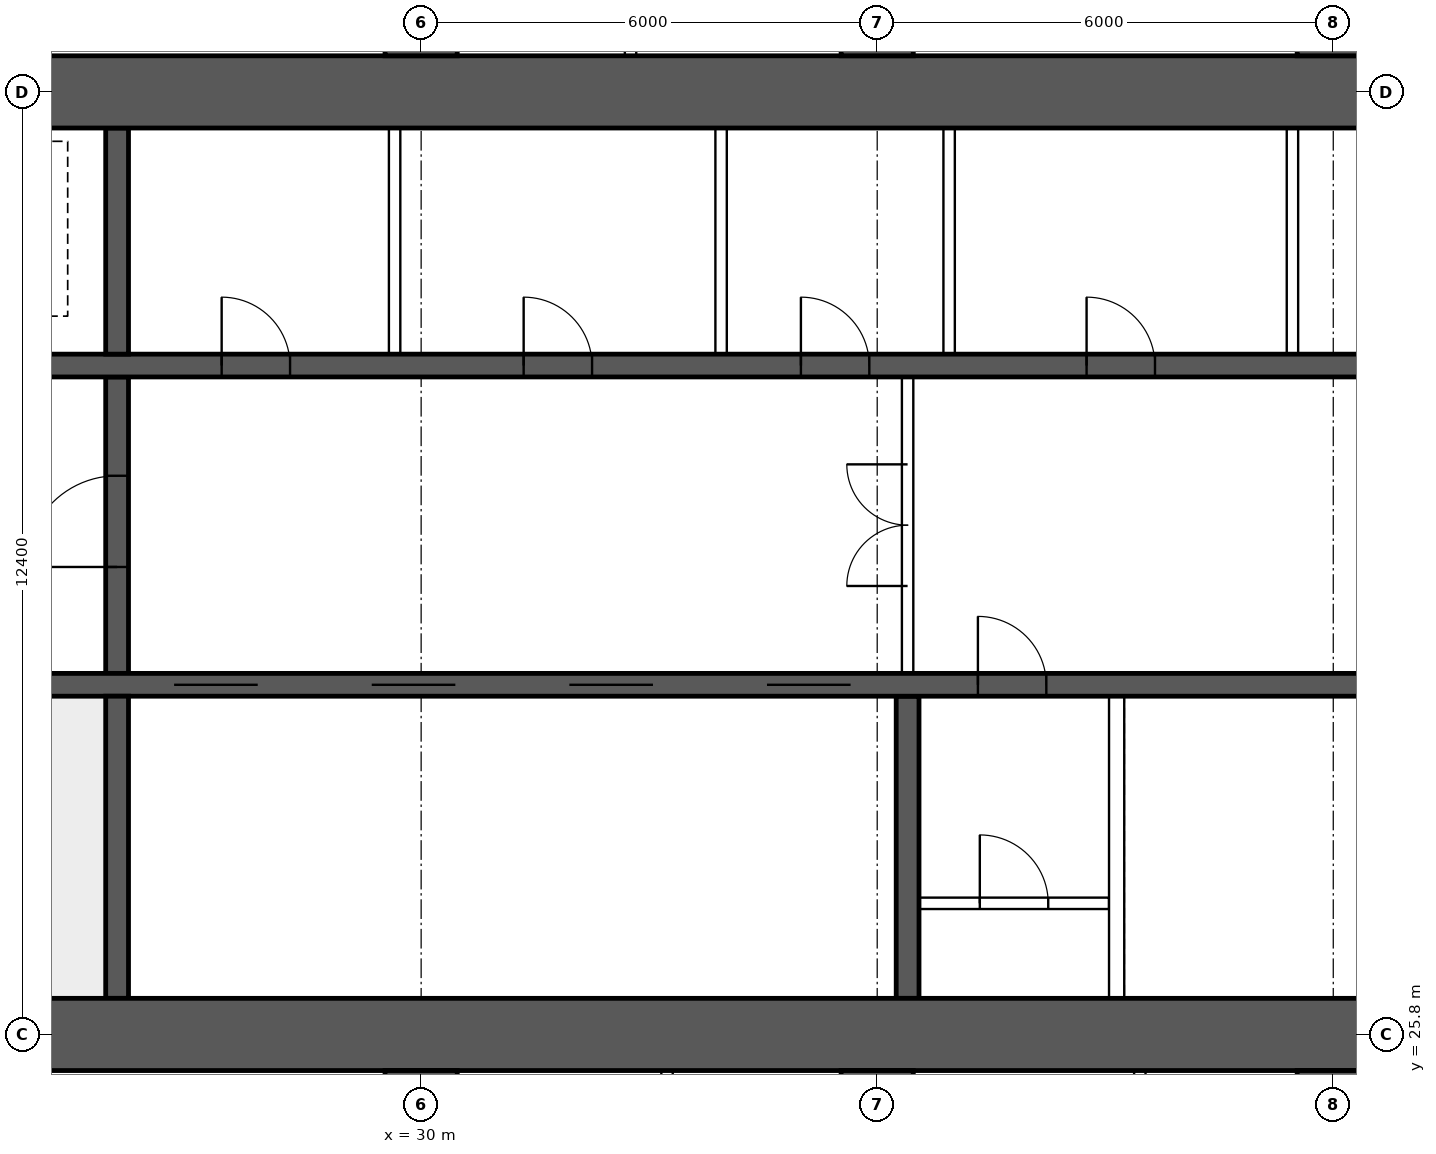
"""IFC4 building model, lengths in metres.
Left out: names, types, materials, properties, quantities, classifications, styles, units other than length and angle.
Written with IfcOpenShell. Run it as: python <this file> out.ifc"""

import sys

from ifc_helpers import new_model, si_unit, direction, frame, frame_2d, origin, place, context, subcontext, project, spatial, rectangle, extrude, element, fill, save


model = new_model("IFC4")
c1 = context("Model", 3, precision=1e-05, world=origin(), true_north=direction((0.0, 1.0)))
c2 = subcontext(c1, "Body", "Model", "MODEL_VIEW")
j1 = project(units=[si_unit("LENGTHUNIT", "METRE"), si_unit("PLANEANGLEUNIT", "RADIAN")], contexts=[c1])
p1 = place(None, origin())
s1 = spatial("IfcSite", under=j1, at=p1, CompositionType="ELEMENT")
p2 = place(p1, origin())
s2 = spatial("IfcBuilding", under=s1, at=p2, CompositionType="ELEMENT")
p3 = place(p2, frame((0.0, 0.0, 91.9)))
s3 = spatial("IfcBuildingStorey", under=s2, at=p3, CompositionType="ELEMENT", Elevation=91.9)
for number, where, z_axis, x_axis in (
    (1, (18.0, 25.8, 0.0), (0.0, 0.0, 1.0), (1.0, 0.0, 0.0)),
    (2, (18.0, 38.2, 0.0), (0.0, 0.0, 1.0), (1.0, 0.0, 0.0)),
):
    element("IfcWall", number, at=place(p3, frame(where, z_axis=z_axis, x_axis=x_axis)), inside=s3, PredefinedType="SHEAR", context=c2, shape_type="SweptSolid", body=[
        extrude(rectangle(XDim=48.0, YDim=0.95, at=frame_2d((24.0, 0.0))), origin(), (0.0, 0.0, 1.0), 3.75),
    ])
p4 = place(p3, frame((18.475, 30.4, 0.0), z_axis=(0.0, 0.0, 1.0), x_axis=(1.0, 0.0, 0.0)))
e3 = element("IfcWall", 3, at=p4, inside=s3, PredefinedType="SHEAR", context=c2, shape_type="SweptSolid", body=[
    extrude(rectangle(XDim=47.05, YDim=0.3, at=frame_2d((23.525, 0.0))), origin(), (0.0, 0.0, 1.0), 3.75),
])
p5 = place(p4, frame((0.4, 0.0, 0.0)))
e4 = element("IfcOpeningElement", 4, at=p5, cuts=e3, PredefinedType="OPENING", context=c2, shape_type="SweptSolid", body=[
    extrude(rectangle(XDim=1.0, YDim=2.1, at=frame_2d((0.5, 1.05))), frame((0.0, 0.16, 0.0), z_axis=(0.0, -1.0, 0.0), x_axis=(1.0, 0.0, 0.0)), (0.0, 0.0, 1.0), 0.32),
])
p6 = place(p4, frame((45.65, 0.0, 0.0)))
e5 = element("IfcOpeningElement", 5, at=p6, cuts=e3, PredefinedType="OPENING", context=c2, shape_type="SweptSolid", body=[
    extrude(rectangle(XDim=1.0, YDim=2.1, at=frame_2d((0.5, 1.05))), frame((0.0, 0.16, 0.0), z_axis=(0.0, -1.0, 0.0), x_axis=(1.0, 0.0, 0.0)), (0.0, 0.0, 1.0), 0.32),
])
p7 = place(p4, frame((8.275, 0.0, 0.0)))
e6 = element("IfcOpeningElement", 6, at=p7, cuts=e3, PredefinedType="OPENING", context=c2, shape_type="SweptSolid", body=[
    extrude(rectangle(XDim=1.1, YDim=2.1, at=frame_2d((0.55, 1.05))), frame((0.0, 0.16, 0.0), z_axis=(0.0, -1.0, 0.0), x_axis=(1.0, 0.0, 0.0)), (0.0, 0.0, 1.0), 0.32),
])
p8 = place(p4, frame((10.875, 0.0, 0.0)))
e7 = element("IfcOpeningElement", 7, at=p8, cuts=e3, PredefinedType="OPENING", context=c2, shape_type="SweptSolid", body=[
    extrude(rectangle(XDim=1.1, YDim=2.1, at=frame_2d((0.55, 1.05))), frame((0.0, 0.16, 0.0), z_axis=(0.0, -1.0, 0.0), x_axis=(1.0, 0.0, 0.0)), (0.0, 0.0, 1.0), 0.32),
])
p9 = place(p4, frame((13.475, 0.0, 0.0)))
e8 = element("IfcOpeningElement", 8, at=p9, cuts=e3, PredefinedType="OPENING", context=c2, shape_type="SweptSolid", body=[
    extrude(rectangle(XDim=1.1, YDim=2.1, at=frame_2d((0.55, 1.05))), frame((0.0, 0.16, 0.0), z_axis=(0.0, -1.0, 0.0), x_axis=(1.0, 0.0, 0.0)), (0.0, 0.0, 1.0), 0.32),
])
p10 = place(p4, frame((16.075, 0.0, 0.0)))
e9 = element("IfcOpeningElement", 9, at=p10, cuts=e3, PredefinedType="OPENING", context=c2, shape_type="SweptSolid", body=[
    extrude(rectangle(XDim=1.1, YDim=2.1, at=frame_2d((0.55, 1.05))), frame((0.0, 0.16, 0.0), z_axis=(0.0, -1.0, 0.0), x_axis=(1.0, 0.0, 0.0)), (0.0, 0.0, 1.0), 0.32),
])
p11 = place(p4, frame((18.85, 0.0, 0.0)))
e10 = element("IfcOpeningElement", 10, at=p11, cuts=e3, PredefinedType="OPENING", context=c2, shape_type="SweptSolid", body=[
    extrude(rectangle(XDim=0.9, YDim=2.1, at=frame_2d((0.45, 1.05))), frame((0.0, 0.16, 0.0), z_axis=(0.0, -1.0, 0.0), x_axis=(1.0, 0.0, 0.0)), (0.0, 0.0, 1.0), 0.32),
])
p12 = place(p4, frame((30.142, 0.0, 0.0)))
e11 = element("IfcOpeningElement", 11, at=p12, cuts=e3, PredefinedType="OPENING", context=c2, shape_type="SweptSolid", body=[
    extrude(rectangle(XDim=1.1, YDim=2.1, at=frame_2d((0.55, 1.05))), frame((0.0, 0.16, 0.0), z_axis=(0.0, -1.0, 0.0), x_axis=(1.0, 0.0, 0.0)), (0.0, 0.0, 1.0), 0.32),
])
p13 = place(p4, frame((33.675, 0.0, 0.0)))
e12 = element("IfcOpeningElement", 12, at=p13, cuts=e3, PredefinedType="OPENING", context=c2, shape_type="SweptSolid", body=[
    extrude(rectangle(XDim=1.1, YDim=2.1, at=frame_2d((0.55, 1.05))), frame((0.0, 0.16, 0.0), z_axis=(0.0, -1.0, 0.0), x_axis=(1.0, 0.0, 0.0)), (0.0, 0.0, 1.0), 0.32),
])
p14 = place(p4, frame((37.208, 0.0, 0.0)))
e13 = element("IfcOpeningElement", 13, at=p14, cuts=e3, PredefinedType="OPENING", context=c2, shape_type="SweptSolid", body=[
    extrude(rectangle(XDim=1.1, YDim=2.1, at=frame_2d((0.55, 1.05))), frame((0.0, 0.16, 0.0), z_axis=(0.0, -1.0, 0.0), x_axis=(1.0, 0.0, 0.0)), (0.0, 0.0, 1.0), 0.32),
])
p15 = place(p3, frame((18.475, 34.6, 0.0), z_axis=(0.0, 0.0, 1.0), x_axis=(1.0, 0.0, 0.0)))
e14 = element("IfcWall", 14, at=p15, inside=s3, PredefinedType="SHEAR", context=c2, shape_type="SweptSolid", body=[
    extrude(rectangle(XDim=47.05, YDim=0.3, at=frame_2d((23.525, 0.0))), origin(), (0.0, 0.0, 1.0), 3.75),
])
p16 = place(p15, frame((0.9, 0.0, 0.0)))
e15 = element("IfcOpeningElement", 15, at=p16, cuts=e14, PredefinedType="OPENING", context=c2, shape_type="SweptSolid", body=[
    extrude(rectangle(XDim=1.1, YDim=2.1, at=frame_2d((0.55, 1.05))), frame((0.0, 0.16, 0.0), z_axis=(0.0, -1.0, 0.0), x_axis=(1.0, 0.0, 0.0)), (0.0, 0.0, 1.0), 0.32),
])
p17 = place(p15, frame((45.05, 0.0, 0.0)))
e16 = element("IfcOpeningElement", 16, at=p17, cuts=e14, PredefinedType="OPENING", context=c2, shape_type="SweptSolid", body=[
    extrude(rectangle(XDim=1.1, YDim=2.1, at=frame_2d((0.55, 1.05))), frame((0.0, 0.16, 0.0), z_axis=(0.0, -1.0, 0.0), x_axis=(1.0, 0.0, 0.0)), (0.0, 0.0, 1.0), 0.32),
])
p18 = place(p15, frame((4.125, 0.0, 0.0)))
e17 = element("IfcOpeningElement", 17, at=p18, cuts=e14, PredefinedType="OPENING", context=c2, shape_type="SweptSolid", body=[
    extrude(rectangle(XDim=0.9, YDim=2.1, at=frame_2d((0.45, 1.05))), frame((0.0, 0.16, 0.0), z_axis=(0.0, -1.0, 0.0), x_axis=(1.0, 0.0, 0.0)), (0.0, 0.0, 1.0), 0.32),
])
p19 = place(p15, frame((42.025, 0.0, 0.0)))
e18 = element("IfcOpeningElement", 18, at=p19, cuts=e14, PredefinedType="OPENING", context=c2, shape_type="SweptSolid", body=[
    extrude(rectangle(XDim=0.9, YDim=2.1, at=frame_2d((0.45, 1.05))), frame((0.0, 0.16, 0.0), z_axis=(0.0, -1.0, 0.0), x_axis=(1.0, 0.0, 0.0)), (0.0, 0.0, 1.0), 0.32),
])
p20 = place(p15, frame((8.9, 0.0, 0.0)))
e19 = element("IfcOpeningElement", 19, at=p20, cuts=e14, PredefinedType="OPENING", context=c2, shape_type="SweptSolid", body=[
    extrude(rectangle(XDim=0.9, YDim=2.1, at=frame_2d((0.45, 1.05))), frame((0.0, 0.16, 0.0), z_axis=(0.0, -1.0, 0.0), x_axis=(1.0, 0.0, 0.0)), (0.0, 0.0, 1.0), 0.32),
])
p21 = place(p15, frame((12.874, 0.0, 0.0)))
e20 = element("IfcOpeningElement", 20, at=p21, cuts=e14, PredefinedType="OPENING", context=c2, shape_type="SweptSolid", body=[
    extrude(rectangle(XDim=0.9, YDim=2.1, at=frame_2d((0.45, 1.05))), frame((0.0, 0.16, 0.0), z_axis=(0.0, -1.0, 0.0), x_axis=(1.0, 0.0, 0.0)), (0.0, 0.0, 1.0), 0.32),
])
p22 = place(p15, frame((16.521, 0.0, 0.0)))
e21 = element("IfcOpeningElement", 21, at=p22, cuts=e14, PredefinedType="OPENING", context=c2, shape_type="SweptSolid", body=[
    extrude(rectangle(XDim=0.9, YDim=2.1, at=frame_2d((0.45, 1.05))), frame((0.0, 0.16, 0.0), z_axis=(0.0, -1.0, 0.0), x_axis=(1.0, 0.0, 0.0)), (0.0, 0.0, 1.0), 0.32),
])
p23 = place(p15, frame((20.28, 0.0, 0.0)))
e22 = element("IfcOpeningElement", 22, at=p23, cuts=e14, PredefinedType="OPENING", context=c2, shape_type="SweptSolid", body=[
    extrude(rectangle(XDim=0.9, YDim=2.1, at=frame_2d((0.45, 1.05))), frame((0.0, 0.16, 0.0), z_axis=(0.0, -1.0, 0.0), x_axis=(1.0, 0.0, 0.0)), (0.0, 0.0, 1.0), 0.32),
])
p24 = place(p15, frame((24.686, 0.0, 0.0)))
e23 = element("IfcOpeningElement", 23, at=p24, cuts=e14, PredefinedType="OPENING", context=c2, shape_type="SweptSolid", body=[
    extrude(rectangle(XDim=0.9, YDim=2.1, at=frame_2d((0.45, 1.05))), frame((0.0, 0.16, 0.0), z_axis=(0.0, -1.0, 0.0), x_axis=(1.0, 0.0, 0.0)), (0.0, 0.0, 1.0), 0.32),
])
p25 = place(p15, frame((27.483, 0.0, 0.0)))
e24 = element("IfcOpeningElement", 24, at=p25, cuts=e14, PredefinedType="OPENING", context=c2, shape_type="SweptSolid", body=[
    extrude(rectangle(XDim=0.9, YDim=2.1, at=frame_2d((0.45, 1.05))), frame((0.0, 0.16, 0.0), z_axis=(0.0, -1.0, 0.0), x_axis=(1.0, 0.0, 0.0)), (0.0, 0.0, 1.0), 0.32),
])
p26 = place(p15, frame((30.666, 0.0, 0.0)))
e25 = element("IfcOpeningElement", 25, at=p26, cuts=e14, PredefinedType="OPENING", context=c2, shape_type="SweptSolid", body=[
    extrude(rectangle(XDim=0.9, YDim=2.1, at=frame_2d((0.45, 1.05))), frame((0.0, 0.16, 0.0), z_axis=(0.0, -1.0, 0.0), x_axis=(1.0, 0.0, 0.0)), (0.0, 0.0, 1.0), 0.32),
])
p27 = place(p15, frame((34.617, 0.0, 0.0)))
e26 = element("IfcOpeningElement", 26, at=p27, cuts=e14, PredefinedType="OPENING", context=c2, shape_type="SweptSolid", body=[
    extrude(rectangle(XDim=0.9, YDim=2.1, at=frame_2d((0.45, 1.05))), frame((0.0, 0.16, 0.0), z_axis=(0.0, -1.0, 0.0), x_axis=(1.0, 0.0, 0.0)), (0.0, 0.0, 1.0), 0.32),
])
p28 = place(p15, frame((37.555, 0.0, 0.0)))
e27 = element("IfcOpeningElement", 27, at=p28, cuts=e14, PredefinedType="OPENING", context=c2, shape_type="SweptSolid", body=[
    extrude(rectangle(XDim=0.9, YDim=2.1, at=frame_2d((0.45, 1.05))), frame((0.0, 0.16, 0.0), z_axis=(0.0, -1.0, 0.0), x_axis=(1.0, 0.0, 0.0)), (0.0, 0.0, 1.0), 0.32),
])
p29 = place(p3, frame((26.0, 26.275, 0.0), z_axis=(0.0, 0.0, 1.0), x_axis=(0.0, 1.0, 0.0)))
e28 = element("IfcWall", 28, at=p29, inside=s3, PredefinedType="SHEAR", context=c2, shape_type="SweptSolid", body=[
    extrude(rectangle(XDim=3.975, YDim=0.3, at=frame_2d((1.988, 0.0))), origin(), (0.0, 0.0, 1.0), 3.75),
])
p30 = place(p3, frame((26.0, 30.55, 0.0), z_axis=(0.0, 0.0, 1.0), x_axis=(0.0, 1.0, 0.0)))
e29 = element("IfcWall", 29, at=p30, inside=s3, PredefinedType="SHEAR", context=c2, shape_type="SweptSolid", body=[
    extrude(rectangle(XDim=3.9, YDim=0.3, at=frame_2d((1.95, 0.0))), origin(), (0.0, 0.0, 1.0), 3.75),
])
p31 = place(p30, frame((1.4, 0.0, 0.0)))
e30 = element("IfcOpeningElement", 30, at=p31, cuts=e29, PredefinedType="OPENING", context=c2, shape_type="SweptSolid", body=[
    extrude(rectangle(XDim=1.2, YDim=2.1, at=frame_2d((0.6, 1.05))), frame((0.0, 0.16, 0.0), z_axis=(0.0, -1.0, 0.0), x_axis=(1.0, 0.0, 0.0)), (0.0, 0.0, 1.0), 0.32),
])
p32 = place(p3, frame((26.0, 34.75, 0.0), z_axis=(0.0, 0.0, 1.0), x_axis=(0.0, 1.0, 0.0)))
e31 = element("IfcWall", 31, at=p32, inside=s3, PredefinedType="SHEAR", context=c2, shape_type="SweptSolid", body=[
    extrude(rectangle(XDim=2.975, YDim=0.3, at=frame_2d((1.488, 0.0))), origin(), (0.0, 0.0, 1.0), 3.75),
])
p33 = place(p3, frame((36.4, 26.275, 0.0), z_axis=(0.0, 0.0, 1.0), x_axis=(0.0, 1.0, 0.0)))
e32 = element("IfcWall", 32, at=p33, inside=s3, PredefinedType="SHEAR", context=c2, shape_type="SweptSolid", body=[
    extrude(rectangle(XDim=3.975, YDim=0.3, at=frame_2d((1.988, 0.0))), origin(), (0.0, 0.0, 1.0), 3.75),
])
for number, where, z_axis, x_axis in (
    (33, (30.0, 16.0, 0.0), (0.0, 0.0, 1.0), (0.0, 1.0, 0.0)),
    (34, (30.0, 38.675, 0.0), (0.0, 0.0, 1.0), (0.0, 1.0, 0.0)),
    (35, (36.0, 16.0, 0.0), (0.0, 0.0, 1.0), (0.0, 1.0, 0.0)),
    (36, (36.0, 38.675, 0.0), (0.0, 0.0, 1.0), (0.0, 1.0, 0.0)),
    (37, (42.0, 16.0, 0.0), (0.0, 0.0, 1.0), (0.0, 1.0, 0.0)),
    (38, (42.0, 38.675, 0.0), (0.0, 0.0, 1.0), (0.0, 1.0, 0.0)),
):
    element("IfcWall", number, at=place(p3, frame(where, z_axis=z_axis, x_axis=x_axis)), inside=s3, PredefinedType="SHEAR", context=c2, shape_type="SweptSolid", body=[
        extrude(rectangle(XDim=9.325, YDim=0.95, at=frame_2d((4.663, 0.0))), origin(), (0.0, 0.0, 1.0), 3.75),
    ])
p34 = place(p3, frame((36.4, 30.55, 0.0), z_axis=(0.0, 0.0, 1.0), x_axis=(0.0, 1.0, 0.0)))
e39 = element("IfcWall", 39, at=p34, inside=s3, PredefinedType="SOLIDWALL", context=c2, shape_type="SweptSolid", body=[
    extrude(rectangle(XDim=3.9, YDim=0.15, at=frame_2d((1.95, 0.0))), origin(), (0.0, 0.0, 1.0), 3.5),
])
p35 = place(p34, frame((1.15, 0.0, 0.0)))
e40 = element("IfcOpeningElement", 40, at=p35, cuts=e39, PredefinedType="OPENING", context=c2, shape_type="SweptSolid", body=[
    extrude(rectangle(XDim=1.6, YDim=2.1, at=frame_2d((0.8, 1.05))), frame((0.0, 0.085, 0.0), z_axis=(0.0, -1.0, 0.0), x_axis=(1.0, 0.0, 0.0)), (0.0, 0.0, 1.0), 0.17),
])
for number, where, z_axis, x_axis in (
    (41, (29.651, 34.75, 0.0), (0.0, 0.0, 1.0), (0.0, 1.0, 0.0)),
    (42, (33.946, 34.75, 0.0), (0.0, 0.0, 1.0), (0.0, 1.0, 0.0)),
    (43, (36.946, 34.75, 0.0), (0.0, 0.0, 1.0), (0.0, 1.0, 0.0)),
    (44, (41.463, 34.75, 0.0), (0.0, 0.0, 1.0), (0.0, 1.0, 0.0)),
):
    element("IfcWall", number, at=place(p3, frame(where, z_axis=z_axis, x_axis=x_axis)), inside=s3, PredefinedType="SOLIDWALL", context=c2, shape_type="SweptSolid", body=[
        extrude(rectangle(XDim=2.975, YDim=0.15, at=frame_2d((1.488, 0.0))), origin(), (0.0, 0.0, 1.0), 3.5),
    ])
p36 = place(p3, frame((36.55, 27.525, 0.0), z_axis=(0.0, 0.0, 1.0), x_axis=(1.0, 0.0, 0.0)))
e45 = element("IfcWall", 45, at=p36, inside=s3, PredefinedType="SOLIDWALL", context=c2, shape_type="SweptSolid", body=[
    extrude(rectangle(XDim=2.5, YDim=0.15, at=frame_2d((1.25, 0.0))), origin(), (0.0, 0.0, 1.0), 3.5),
])
p37 = place(p36, frame((0.8, 0.0, 0.0)))
e46 = element("IfcOpeningElement", 46, at=p37, cuts=e45, PredefinedType="OPENING", context=c2, shape_type="SweptSolid", body=[
    extrude(rectangle(XDim=0.9, YDim=2.1, at=frame_2d((0.45, 1.05))), frame((0.0, 0.085, 0.0), z_axis=(0.0, -1.0, 0.0), x_axis=(1.0, 0.0, 0.0)), (0.0, 0.0, 1.0), 0.17),
])
p38 = place(p3, frame((39.15, 26.275, 0.0), z_axis=(0.0, 0.0, 1.0), x_axis=(0.0, 1.0, 0.0)))
e47 = element("IfcWall", 47, at=p38, inside=s3, PredefinedType="SOLIDWALL", context=c2, shape_type="SweptSolid", body=[
    extrude(rectangle(XDim=3.975, YDim=0.2, at=frame_2d((1.988, 0.0))), origin(), (0.0, 0.0, 1.0), 3.5),
])
for number, where, z_axis, x_axis in (
    (48, (33.235, 16.1, 0.0), (0.0, 0.0, 1.0), (0.0, 1.0, 0.0)),
    (49, (39.455, 16.1, 0.0), (0.0, 0.0, 1.0), (0.0, 1.0, 0.0)),
    (50, (32.755, 38.675, 0.0), (0.0, 0.0, 1.0), (0.0, 1.0, 0.0)),
):
    element("IfcWall", number, at=place(p3, frame(where, z_axis=z_axis, x_axis=x_axis)), inside=s3, PredefinedType="PARTITIONING", context=c2, shape_type="SweptSolid", body=[
        extrude(rectangle(XDim=9.225, YDim=0.15, at=frame_2d((4.612, 0.0))), origin(), (0.0, 0.0, 1.0), 3.5),
    ])
p39 = place(p35, origin())
e51 = element("IfcDoor", 51, at=p39, inside=s3, OperationType="DOUBLE_DOOR_SINGLE_SWING", PredefinedType="DOOR", context=c2, shape_type="SweptSolid", body=[
    extrude(rectangle(XDim=1.6, YDim=2.1, at=frame_2d((0.8, 1.05))), frame((0.0, 0.025, 0.0), z_axis=(0.0, -1.0, 0.0), x_axis=(1.0, 0.0, 0.0)), (0.0, 0.0, 1.0), 0.05),
])
fill(e40, e51)
p40 = place(p31, origin())
e52 = element("IfcDoor", 52, at=p40, inside=s3, OperationType="SINGLE_SWING_LEFT", PredefinedType="DOOR", context=c2, shape_type="SweptSolid", body=[
    extrude(rectangle(XDim=1.2, YDim=2.1, at=frame_2d((0.6, 1.05))), frame((0.0, 0.025, 0.0), z_axis=(0.0, -1.0, 0.0), x_axis=(1.0, 0.0, 0.0)), (0.0, 0.0, 1.0), 0.05),
])
fill(e30, e52)
p41 = place(p20, origin())
e53 = element("IfcDoor", 53, at=p41, inside=s3, OperationType="SINGLE_SWING_LEFT", PredefinedType="DOOR", context=c2, shape_type="SweptSolid", body=[
    extrude(rectangle(XDim=0.9, YDim=2.1, at=frame_2d((0.45, 1.05))), frame((0.0, 0.025, 0.0), z_axis=(0.0, -1.0, 0.0), x_axis=(1.0, 0.0, 0.0)), (0.0, 0.0, 1.0), 0.05),
])
fill(e19, e53)
p42 = place(p21, origin())
e54 = element("IfcDoor", 54, at=p42, inside=s3, OperationType="SINGLE_SWING_LEFT", PredefinedType="DOOR", context=c2, shape_type="SweptSolid", body=[
    extrude(rectangle(XDim=0.9, YDim=2.1, at=frame_2d((0.45, 1.05))), frame((0.0, 0.025, 0.0), z_axis=(0.0, -1.0, 0.0), x_axis=(1.0, 0.0, 0.0)), (0.0, 0.0, 1.0), 0.05),
])
fill(e20, e54)
p43 = place(p22, origin())
e55 = element("IfcDoor", 55, at=p43, inside=s3, OperationType="SINGLE_SWING_LEFT", PredefinedType="DOOR", context=c2, shape_type="SweptSolid", body=[
    extrude(rectangle(XDim=0.9, YDim=2.1, at=frame_2d((0.45, 1.05))), frame((0.0, 0.025, 0.0), z_axis=(0.0, -1.0, 0.0), x_axis=(1.0, 0.0, 0.0)), (0.0, 0.0, 1.0), 0.05),
])
fill(e21, e55)
p44 = place(p23, origin())
e56 = element("IfcDoor", 56, at=p44, inside=s3, OperationType="SINGLE_SWING_LEFT", PredefinedType="DOOR", context=c2, shape_type="SweptSolid", body=[
    extrude(rectangle(XDim=0.9, YDim=2.1, at=frame_2d((0.45, 1.05))), frame((0.0, 0.025, 0.0), z_axis=(0.0, -1.0, 0.0), x_axis=(1.0, 0.0, 0.0)), (0.0, 0.0, 1.0), 0.05),
])
fill(e22, e56)
p45 = place(p7, origin())
e57 = element("IfcDoor", 57, at=p45, inside=s3, OperationType="DOUBLE_DOOR_SLIDING", PredefinedType="DOOR", context=c2, shape_type="SweptSolid", body=[
    extrude(rectangle(XDim=1.1, YDim=2.1, at=frame_2d((0.55, 1.05))), frame((0.0, 0.025, 0.0), z_axis=(0.0, -1.0, 0.0), x_axis=(1.0, 0.0, 0.0)), (0.0, 0.0, 1.0), 0.05),
])
fill(e6, e57)
p46 = place(p8, origin())
e58 = element("IfcDoor", 58, at=p46, inside=s3, OperationType="DOUBLE_DOOR_SLIDING", PredefinedType="DOOR", context=c2, shape_type="SweptSolid", body=[
    extrude(rectangle(XDim=1.1, YDim=2.1, at=frame_2d((0.55, 1.05))), frame((0.0, 0.025, 0.0), z_axis=(0.0, -1.0, 0.0), x_axis=(1.0, 0.0, 0.0)), (0.0, 0.0, 1.0), 0.05),
])
fill(e7, e58)
p47 = place(p9, origin())
e59 = element("IfcDoor", 59, at=p47, inside=s3, OperationType="DOUBLE_DOOR_SLIDING", PredefinedType="DOOR", context=c2, shape_type="SweptSolid", body=[
    extrude(rectangle(XDim=1.1, YDim=2.1, at=frame_2d((0.55, 1.05))), frame((0.0, 0.025, 0.0), z_axis=(0.0, -1.0, 0.0), x_axis=(1.0, 0.0, 0.0)), (0.0, 0.0, 1.0), 0.05),
])
fill(e8, e59)
p48 = place(p10, origin())
e60 = element("IfcDoor", 60, at=p48, inside=s3, OperationType="DOUBLE_DOOR_SLIDING", PredefinedType="DOOR", context=c2, shape_type="SweptSolid", body=[
    extrude(rectangle(XDim=1.1, YDim=2.1, at=frame_2d((0.55, 1.05))), frame((0.0, 0.025, 0.0), z_axis=(0.0, -1.0, 0.0), x_axis=(1.0, 0.0, 0.0)), (0.0, 0.0, 1.0), 0.05),
])
fill(e9, e60)
p49 = place(p37, origin())
e61 = element("IfcDoor", 61, at=p49, inside=s3, OperationType="SINGLE_SWING_LEFT", PredefinedType="DOOR", context=c2, shape_type="SweptSolid", body=[
    extrude(rectangle(XDim=0.9, YDim=2.1, at=frame_2d((0.45, 1.05))), frame((0.0, 0.025, 0.0), z_axis=(0.0, -1.0, 0.0), x_axis=(1.0, 0.0, 0.0)), (0.0, 0.0, 1.0), 0.05),
])
fill(e46, e61)
p50 = place(p11, origin())
e62 = element("IfcDoor", 62, at=p50, inside=s3, OperationType="SINGLE_SWING_LEFT", PredefinedType="DOOR", context=c2, shape_type="SweptSolid", body=[
    extrude(rectangle(XDim=0.9, YDim=2.1, at=frame_2d((0.45, 1.05))), frame((0.0, 0.025, 0.0), z_axis=(0.0, -1.0, 0.0), x_axis=(1.0, 0.0, 0.0)), (0.0, 0.0, 1.0), 0.05),
])
fill(e10, e62)
save(model, sys.argv[1])
